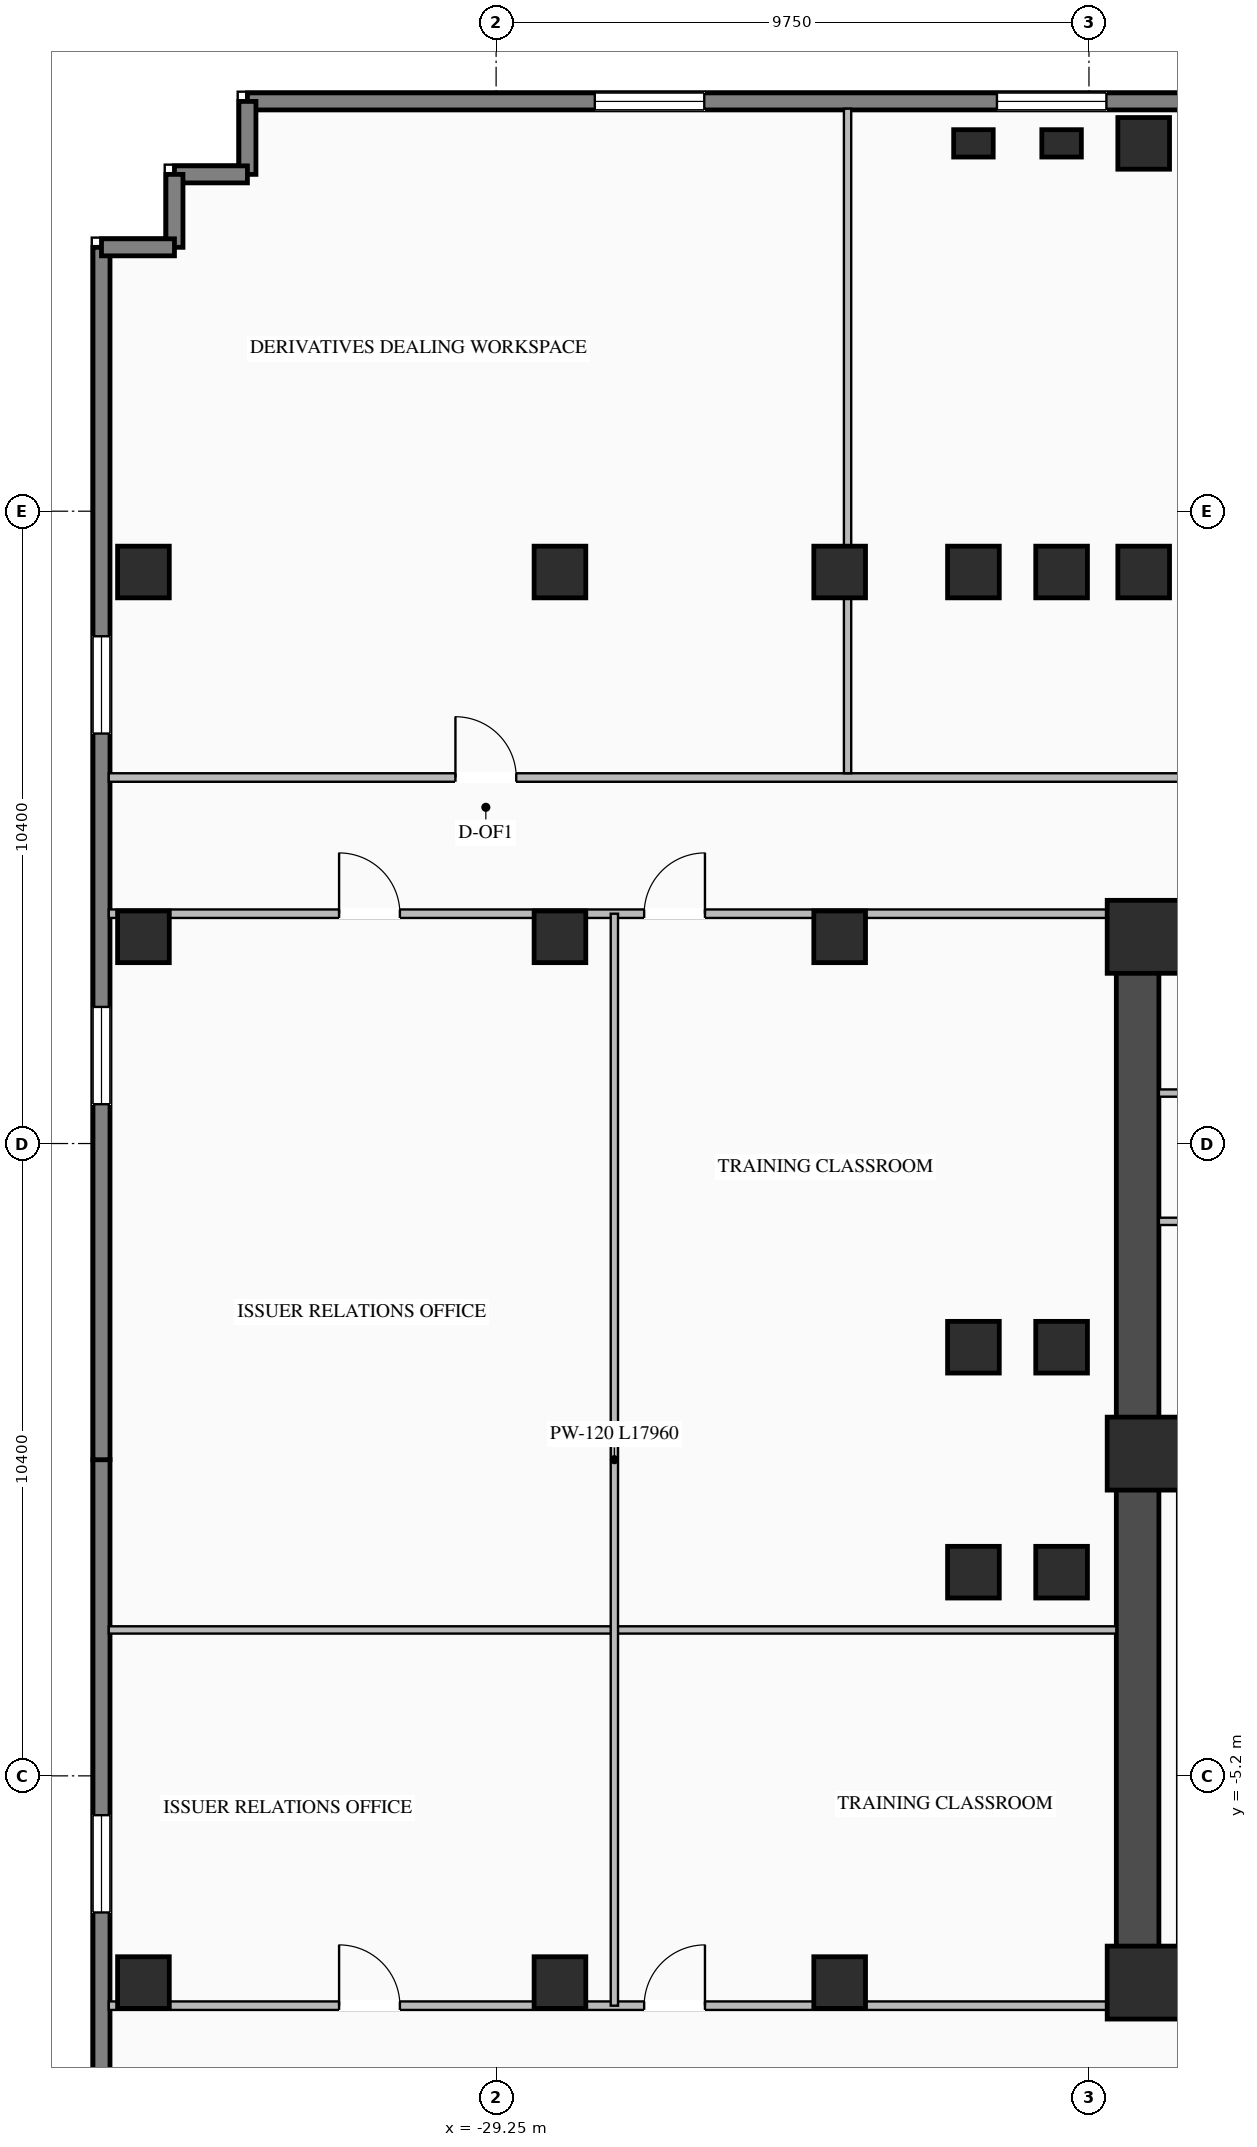
"""IFC4 building model, lengths in metres.
Left out: names, types, materials, properties, quantities, classifications, styles, units other than length and angle.
Written with IfcOpenShell. Run it as: python <this file> out.ifc"""

import sys

from ifc_helpers import new_model, si_unit, direction, frame, frame_2d, origin, origin_2d, place, context, subcontext, project, spatial, rectangle, i_section, extrude, element, fill, save


model = new_model("IFC4")
c1 = context("Model", 3, precision=1e-05, world=origin(), true_north=direction((0.0, 1.0)))
c2 = subcontext(c1, "Body", "Model", "MODEL_VIEW")
j1 = project(units=[si_unit("LENGTHUNIT", "METRE"), si_unit("PLANEANGLEUNIT", "RADIAN")], contexts=[c1])
p1 = place(None, origin())
s1 = spatial("IfcSite", under=j1, at=p1, CompositionType="ELEMENT")
p2 = place(p1, origin())
s2 = spatial("IfcBuilding", under=s1, at=p2, CompositionType="ELEMENT")
p3 = place(p2, frame((0.0, 0.0, 41.55)))
s3 = spatial("IfcBuildingStorey", under=s2, at=p3, CompositionType="ELEMENT", Elevation=41.55)
p4 = place(p3, frame((-19.05, -8.7, 0.0), z_axis=(0.0, 0.0, 1.0), x_axis=(1.0, 0.0, 0.0)))
e1 = element("IfcWall", 1, at=p4, inside=s3, PredefinedType="SHEAR", context=c2, shape_type="SweptSolid", body=[
    extrude(rectangle(XDim=10.25, YDim=0.7, at=frame_2d((5.125, 0.0))), origin(), (0.0, 0.0, 1.0), 3.27),
])
p5 = place(p3, frame((-19.05, 8.7, 0.0), z_axis=(0.0, 0.0, 1.0), x_axis=(1.0, 0.0, 0.0)))
e2 = element("IfcWall", 2, at=p5, inside=s3, PredefinedType="SHEAR", context=c2, shape_type="SweptSolid", body=[
    extrude(rectangle(XDim=10.25, YDim=0.7, at=frame_2d((5.125, 0.0))), origin(), (0.0, 0.0, 1.0), 3.27),
])
p6 = place(p5, frame((5.6, 0.0, 0.0)))
e3 = element("IfcOpeningElement", 3, at=p6, cuts=e2, PredefinedType="OPENING", context=c2, shape_type="SweptSolid", body=[
    extrude(rectangle(XDim=1.4, YDim=2.05, at=frame_2d((0.7, 1.025))), frame((0.0, 0.36, 0.0), z_axis=(0.0, -1.0, 0.0), x_axis=(1.0, 0.0, 0.0)), (0.0, 0.0, 1.0), 0.72),
])
p7 = place(p3, frame((-18.7, -8.35, 0.0), z_axis=(0.0, 0.0, 1.0), x_axis=(0.0, 1.0, 0.0)))
e4 = element("IfcWall", 4, at=p7, inside=s3, PredefinedType="SHEAR", context=c2, shape_type="SweptSolid", body=[
    extrude(rectangle(XDim=16.7, YDim=0.7, at=frame_2d((8.35, 0.0))), origin(), (0.0, 0.0, 1.0), 3.27),
])
for number, where, z_axis, x_axis in (
    (5, (-18.6, -8.6, 0.0), (0.0, 0.0, 1.0), (1.0, 0.0, 0.0)),
    (6, (-18.6, 0.1, 0.0), (0.0, 0.0, 1.0), (1.0, 0.0, 0.0)),
    (7, (-18.6, 8.6, 0.0), (0.0, 0.0, 1.0), (1.0, 0.0, 0.0)),
):
    element("IfcColumn", number, at=place(p3, frame(where, z_axis=z_axis, x_axis=x_axis)), inside=s3, PredefinedType="COLUMN", context=c2, shape_type="SweptSolid", body=[
        extrude(rectangle(XDim=1.2, YDim=1.2, at=origin_2d()), origin(), (0.0, 0.0, 1.0), 3.45),
    ])
for number, where, z_axis, x_axis in (
    (8, (-21.4, 14.6, 0.0), (0.0, 0.0, 1.0), (1.0, 0.0, 0.0)),
    (9, (-19.95, 14.6, 0.0), (0.0, 0.0, 1.0), (1.0, 0.0, 0.0)),
    (10, (-18.6, 14.6, 0.0), (0.0, 0.0, 1.0), (1.0, 0.0, 0.0)),
    (11, (-21.4, -1.85, 0.0), (0.0, 0.0, 1.0), (1.0, 0.0, 0.0)),
    (12, (-21.4, 1.85, 0.0), (0.0, 0.0, 1.0), (1.0, 0.0, 0.0)),
    (13, (-19.95, -1.85, 0.0), (0.0, 0.0, 1.0), (1.0, 0.0, 0.0)),
    (14, (-19.95, 1.85, 0.0), (0.0, 0.0, 1.0), (1.0, 0.0, 0.0)),
    (15, (-23.6, -8.6, 0.0), (0.0, 0.0, 1.0), (1.0, 0.0, 0.0)),
    (16, (-23.6, 8.6, 0.0), (0.0, 0.0, 1.0), (1.0, 0.0, 0.0)),
    (17, (-23.6, 14.6, 0.0), (0.0, 0.0, 1.0), (1.0, 0.0, 0.0)),
    (18, (-28.2, -8.6, 0.0), (0.0, 0.0, 1.0), (1.0, 0.0, 0.0)),
    (19, (-28.2, 8.6, 0.0), (0.0, 0.0, 1.0), (1.0, 0.0, 0.0)),
    (20, (-28.2, 14.6, 0.0), (0.0, 0.0, 1.0), (1.0, 0.0, 0.0)),
    (21, (-18.6, 21.65, 0.0), (0.0, 0.0, 1.0), (1.0, 0.0, 0.0)),
    (22, (-35.05, -8.6, 0.0), (0.0, 0.0, 1.0), (1.0, 0.0, 0.0)),
    (23, (-35.05, 8.6, 0.0), (0.0, 0.0, 1.0), (1.0, 0.0, 0.0)),
    (24, (-35.05, 14.6, 0.0), (0.0, 0.0, 1.0), (1.0, 0.0, 0.0)),
):
    element("IfcColumn", number, at=place(p3, frame(where, z_axis=z_axis, x_axis=x_axis)), inside=s3, PredefinedType="COLUMN", context=c2, shape_type="SweptSolid", body=[
        extrude(i_section(OverallWidth=0.85, OverallDepth=0.85, WebThickness=0.032, FlangeThickness=0.048, at=origin_2d()), origin(), (0.0, 0.0, 1.0), 3.45),
    ])
for number, where, z_axis, x_axis in (
    (25, (-21.4, 21.65, 0.0), (0.0, 0.0, 1.0), (1.0, 0.0, 0.0)),
    (26, (-19.95, 21.65, 0.0), (0.0, 0.0, 1.0), (1.0, 0.0, 0.0)),
):
    element("IfcColumn", number, at=place(p3, frame(where, z_axis=z_axis, x_axis=x_axis)), inside=s3, PredefinedType="PILASTER", context=c2, shape_type="SweptSolid", body=[
        extrude(rectangle(XDim=0.65, YDim=0.45, at=origin_2d()), origin(), (0.0, 0.0, 1.0), 3.45),
    ])
p8 = place(p3, frame((-33.34, 22.34, 0.0), z_axis=(0.0, 0.0, 1.0), x_axis=(1.0, 0.0, 0.0)))
e27 = element("IfcWall", 27, at=p8, inside=s3, PredefinedType="STANDARD", context=c2, shape_type="SweptSolid", body=[
    extrude(rectangle(XDim=19.84, YDim=0.28, at=frame_2d((9.92, 0.0))), origin(), (0.0, 0.0, 1.0), 3.25),
])
p9 = place(p8, frame((5.713, 0.0, 0.76)))
e28 = element("IfcOpeningElement", 28, at=p9, cuts=e27, PredefinedType="OPENING", context=c2, shape_type="SweptSolid", body=[
    extrude(rectangle(XDim=1.8, YDim=1.95, at=frame_2d((0.9, 0.975))), frame((0.0, 0.15, 0.0), z_axis=(0.0, -1.0, 0.0), x_axis=(1.0, 0.0, 0.0)), (0.0, 0.0, 1.0), 0.3),
])
p10 = place(p8, frame((12.327, 0.0, 0.76)))
e29 = element("IfcOpeningElement", 29, at=p10, cuts=e27, PredefinedType="OPENING", context=c2, shape_type="SweptSolid", body=[
    extrude(rectangle(XDim=1.8, YDim=1.95, at=frame_2d((0.9, 0.975))), frame((0.0, 0.15, 0.0), z_axis=(0.0, -1.0, 0.0), x_axis=(1.0, 0.0, 0.0)), (0.0, 0.0, 1.0), 0.3),
])
p11 = place(p3, frame((-35.74, -19.94, 0.0), z_axis=(0.0, 0.0, 1.0), x_axis=(0.0, 1.0, 0.0)))
e30 = element("IfcWall", 30, at=p11, inside=s3, PredefinedType="STANDARD", context=c2, shape_type="SweptSolid", body=[
    extrude(rectangle(XDim=19.94, YDim=0.28, at=frame_2d((9.97, 0.0))), origin(), (0.0, 0.0, 1.0), 3.25),
])
p12 = place(p11, frame((6.397, 0.0, 0.76)))
e31 = element("IfcOpeningElement", 31, at=p12, cuts=e30, PredefinedType="OPENING", context=c2, shape_type="SweptSolid", body=[
    extrude(rectangle(XDim=1.6, YDim=1.95, at=frame_2d((0.8, 0.975))), frame((0.0, 0.15, 0.0), z_axis=(0.0, -1.0, 0.0), x_axis=(1.0, 0.0, 0.0)), (0.0, 0.0, 1.0), 0.3),
])
p13 = place(p11, frame((12.493, 0.0, 0.76)))
e32 = element("IfcOpeningElement", 32, at=p13, cuts=e30, PredefinedType="OPENING", context=c2, shape_type="SweptSolid", body=[
    extrude(rectangle(XDim=1.6, YDim=1.95, at=frame_2d((0.8, 0.975))), frame((0.0, 0.15, 0.0), z_axis=(0.0, -1.0, 0.0), x_axis=(1.0, 0.0, 0.0)), (0.0, 0.0, 1.0), 0.3),
])
p14 = place(p3, frame((-35.74, 0.0, 0.0), z_axis=(0.0, 0.0, 1.0), x_axis=(0.0, 1.0, 0.0)))
e33 = element("IfcWall", 33, at=p14, inside=s3, PredefinedType="STANDARD", context=c2, shape_type="SweptSolid", body=[
    extrude(rectangle(XDim=19.94, YDim=0.28, at=frame_2d((9.97, 0.0))), origin(), (0.0, 0.0, 1.0), 3.25),
])
p15 = place(p14, frame((5.847, 0.0, 0.76)))
e34 = element("IfcOpeningElement", 34, at=p15, cuts=e33, PredefinedType="OPENING", context=c2, shape_type="SweptSolid", body=[
    extrude(rectangle(XDim=1.6, YDim=1.95, at=frame_2d((0.8, 0.975))), frame((0.0, 0.15, 0.0), z_axis=(0.0, -1.0, 0.0), x_axis=(1.0, 0.0, 0.0)), (0.0, 0.0, 1.0), 0.3),
])
p16 = place(p14, frame((11.943, 0.0, 0.76)))
e35 = element("IfcOpeningElement", 35, at=p16, cuts=e33, PredefinedType="OPENING", context=c2, shape_type="SweptSolid", body=[
    extrude(rectangle(XDim=1.6, YDim=1.95, at=frame_2d((0.8, 0.975))), frame((0.0, 0.15, 0.0), z_axis=(0.0, -1.0, 0.0), x_axis=(1.0, 0.0, 0.0)), (0.0, 0.0, 1.0), 0.3),
])
p17 = place(p3, frame((-33.34, 22.34, 0.0), z_axis=(0.0, 0.0, 1.0), x_axis=(0.0, -1.0, 0.0)))
e36 = element("IfcWall", 36, at=p17, inside=s3, PredefinedType="STANDARD", context=c2, shape_type="SweptSolid", body=[
    extrude(rectangle(XDim=1.2, YDim=0.28, at=frame_2d((0.6, 0.0))), origin(), (0.0, 0.0, 1.0), 3.25),
])
for number, where, z_axis, x_axis in (
    (37, (-33.34, 21.14, 0.0), (0.0, 0.0, 1.0), (-1.0, 0.0, 0.0)),
    (38, (-34.54, 21.14, 0.0), (0.0, 0.0, 1.0), (0.0, -1.0, 0.0)),
    (39, (-34.54, 19.94, 0.0), (0.0, 0.0, 1.0), (-1.0, 0.0, 0.0)),
):
    element("IfcWall", number, at=place(p3, frame(where, z_axis=z_axis, x_axis=x_axis)), inside=s3, PredefinedType="STANDARD", context=c2, shape_type="SweptSolid", body=[
        extrude(rectangle(XDim=1.2, YDim=0.28, at=frame_2d((0.6, 0.0))), origin(), (0.0, 0.0, 1.0), 3.25),
    ])
p18 = place(p3, frame((-18.35, 3.92, 0.0), z_axis=(0.0, 0.0, 1.0), x_axis=(1.0, 0.0, 0.0)))
e40 = element("IfcWall", 40, at=p18, inside=s3, PredefinedType="STANDARD", context=c2, shape_type="SweptSolid", body=[
    extrude(rectangle(XDim=4.45, YDim=0.12, at=frame_2d((2.225, 0.0))), origin(), (0.0, 0.0, 1.0), 3.25),
])
p19 = place(p3, frame((-18.35, 6.03, 0.0), z_axis=(0.0, 0.0, 1.0), x_axis=(1.0, 0.0, 0.0)))
e41 = element("IfcWall", 41, at=p19, inside=s3, PredefinedType="STANDARD", context=c2, shape_type="SweptSolid", body=[
    extrude(rectangle(XDim=2.2, YDim=0.12, at=frame_2d((1.1, 0.0))), origin(), (0.0, 0.0, 1.0), 3.25),
])
p20 = place(p3, frame((-35.62, 11.22, 0.0), z_axis=(0.0, 0.0, 1.0), x_axis=(1.0, 0.0, 0.0)))
e42 = element("IfcWall", 42, at=p20, inside=s3, PredefinedType="STANDARD", context=c2, shape_type="SweptSolid", body=[
    extrude(rectangle(XDim=71.24, YDim=0.14, at=frame_2d((35.62, 0.0))), origin(), (0.0, 0.0, 1.0), 3.25),
])
p21 = place(p20, frame((5.701, 0.0, 0.0)))
e43 = element("IfcOpeningElement", 43, at=p21, cuts=e42, PredefinedType="OPENING", context=c2, shape_type="SweptSolid", body=[
    extrude(rectangle(XDim=1.0, YDim=2.08, at=frame_2d((0.5, 1.04))), frame((0.0, 0.08, 0.0), z_axis=(0.0, -1.0, 0.0), x_axis=(1.0, 0.0, 0.0)), (0.0, 0.0, 1.0), 0.16),
])
p22 = place(p20, frame((18.762, 0.0, 0.0)))
e44 = element("IfcOpeningElement", 44, at=p22, cuts=e42, PredefinedType="OPENING", context=c2, shape_type="SweptSolid", body=[
    extrude(rectangle(XDim=1.0, YDim=2.08, at=frame_2d((0.5, 1.04))), frame((0.0, 0.08, 0.0), z_axis=(0.0, -1.0, 0.0), x_axis=(1.0, 0.0, 0.0)), (0.0, 0.0, 1.0), 0.16),
])
p23 = place(p20, frame((33.698, 0.0, 0.0)))
e45 = element("IfcOpeningElement", 45, at=p23, cuts=e42, PredefinedType="OPENING", context=c2, shape_type="SweptSolid", body=[
    extrude(rectangle(XDim=1.0, YDim=2.08, at=frame_2d((0.5, 1.04))), frame((0.0, 0.08, 0.0), z_axis=(0.0, -1.0, 0.0), x_axis=(1.0, 0.0, 0.0)), (0.0, 0.0, 1.0), 0.16),
])
p24 = place(p20, frame((49.344, 0.0, 0.0)))
e46 = element("IfcOpeningElement", 46, at=p24, cuts=e42, PredefinedType="OPENING", context=c2, shape_type="SweptSolid", body=[
    extrude(rectangle(XDim=1.0, YDim=2.08, at=frame_2d((0.5, 1.04))), frame((0.0, 0.08, 0.0), z_axis=(0.0, -1.0, 0.0), x_axis=(1.0, 0.0, 0.0)), (0.0, 0.0, 1.0), 0.16),
])
p25 = place(p20, frame((63.827, 0.0, 0.0)))
e47 = element("IfcOpeningElement", 47, at=p25, cuts=e42, PredefinedType="OPENING", context=c2, shape_type="SweptSolid", body=[
    extrude(rectangle(XDim=1.0, YDim=2.08, at=frame_2d((0.5, 1.04))), frame((0.0, 0.08, 0.0), z_axis=(0.0, -1.0, 0.0), x_axis=(1.0, 0.0, 0.0)), (0.0, 0.0, 1.0), 0.16),
])
p26 = place(p3, frame((-23.47, 11.29, 0.0), z_axis=(0.0, 0.0, 1.0), x_axis=(0.0, 1.0, 0.0)))
e48 = element("IfcWall", 48, at=p26, inside=s3, PredefinedType="STANDARD", context=c2, shape_type="SweptSolid", body=[
    extrude(rectangle(XDim=10.93, YDim=0.12, at=frame_2d((5.465, 0.0))), origin(), (0.0, 0.0, 1.0), 2.645),
])
p27 = place(p3, frame((-35.62, 8.98, 0.0), z_axis=(0.0, 0.0, 1.0), x_axis=(1.0, 0.0, 0.0)))
e49 = element("IfcWall", 49, at=p27, inside=s3, PredefinedType="STANDARD", context=c2, shape_type="SweptSolid", body=[
    extrude(rectangle(XDim=16.57, YDim=0.14, at=frame_2d((8.285, 0.0))), origin(), (0.0, 0.0, 1.0), 3.25),
])
p28 = place(p27, frame((3.788, 0.0, 0.0)))
e50 = element("IfcOpeningElement", 50, at=p28, cuts=e49, PredefinedType="OPENING", context=c2, shape_type="SweptSolid", body=[
    extrude(rectangle(XDim=1.0, YDim=2.08, at=frame_2d((0.5, 1.04))), frame((0.0, 0.08, 0.0), z_axis=(0.0, -1.0, 0.0), x_axis=(1.0, 0.0, 0.0)), (0.0, 0.0, 1.0), 0.16),
])
p29 = place(p27, frame((8.805, 0.0, 0.0)))
e51 = element("IfcOpeningElement", 51, at=p29, cuts=e49, PredefinedType="OPENING", context=c2, shape_type="SweptSolid", body=[
    extrude(rectangle(XDim=1.0, YDim=2.08, at=frame_2d((0.5, 1.04))), frame((0.0, 0.08, 0.0), z_axis=(0.0, -1.0, 0.0), x_axis=(1.0, 0.0, 0.0)), (0.0, 0.0, 1.0), 0.16),
])
p30 = place(p3, frame((-35.62, -8.98, 0.0), z_axis=(0.0, 0.0, 1.0), x_axis=(1.0, 0.0, 0.0)))
e52 = element("IfcWall", 52, at=p30, inside=s3, PredefinedType="STANDARD", context=c2, shape_type="SweptSolid", body=[
    extrude(rectangle(XDim=16.57, YDim=0.14, at=frame_2d((8.285, 0.0))), origin(), (0.0, 0.0, 1.0), 3.25),
])
p31 = place(p30, frame((3.788, 0.0, 0.0)))
e53 = element("IfcOpeningElement", 53, at=p31, cuts=e52, PredefinedType="OPENING", context=c2, shape_type="SweptSolid", body=[
    extrude(rectangle(XDim=1.0, YDim=2.08, at=frame_2d((0.5, 1.04))), frame((0.0, 0.08, 0.0), z_axis=(0.0, -1.0, 0.0), x_axis=(1.0, 0.0, 0.0)), (0.0, 0.0, 1.0), 0.16),
])
p32 = place(p30, frame((8.805, 0.0, 0.0)))
e54 = element("IfcOpeningElement", 54, at=p32, cuts=e52, PredefinedType="OPENING", context=c2, shape_type="SweptSolid", body=[
    extrude(rectangle(XDim=1.0, YDim=2.08, at=frame_2d((0.5, 1.04))), frame((0.0, 0.08, 0.0), z_axis=(0.0, -1.0, 0.0), x_axis=(1.0, 0.0, 0.0)), (0.0, 0.0, 1.0), 0.16),
])
p33 = place(p3, frame((-35.62, -2.8, 0.0), z_axis=(0.0, 0.0, 1.0), x_axis=(1.0, 0.0, 0.0)))
e55 = element("IfcWall", 55, at=p33, inside=s3, PredefinedType="STANDARD", context=c2, shape_type="SweptSolid", body=[
    extrude(rectangle(XDim=16.57, YDim=0.12, at=frame_2d((8.285, 0.0))), origin(), (0.0, 0.0, 1.0), 3.25),
])
p34 = place(p3, frame((-27.305, -8.98, 0.0), z_axis=(0.0, 0.0, 1.0), x_axis=(0.0, 1.0, 0.0)))
e56 = element("IfcWall", 56, at=p34, inside=s3, PredefinedType="STANDARD", context=c2, shape_type="SweptSolid", body=[
    extrude(rectangle(XDim=17.96, YDim=0.12, at=frame_2d((8.98, 0.0))), origin(), (0.0, 0.0, 1.0), 3.25),
])
p35 = place(p9, origin())
e57 = element("IfcWindow", 57, at=p35, inside=s3, PartitioningType="SINGLE_PANEL", PredefinedType="WINDOW", context=c2, shape_type="SweptSolid", body=[
    extrude(rectangle(XDim=1.8, YDim=1.95, at=frame_2d((0.9, 0.975))), frame((0.0, 0.03, 0.0), z_axis=(0.0, -1.0, 0.0), x_axis=(1.0, 0.0, 0.0)), (0.0, 0.0, 1.0), 0.06),
])
fill(e28, e57)
p36 = place(p10, origin())
e58 = element("IfcWindow", 58, at=p36, inside=s3, PartitioningType="SINGLE_PANEL", PredefinedType="WINDOW", context=c2, shape_type="SweptSolid", body=[
    extrude(rectangle(XDim=1.8, YDim=1.95, at=frame_2d((0.9, 0.975))), frame((0.0, 0.03, 0.0), z_axis=(0.0, -1.0, 0.0), x_axis=(1.0, 0.0, 0.0)), (0.0, 0.0, 1.0), 0.06),
])
fill(e29, e58)
p37 = place(p13, origin())
e59 = element("IfcWindow", 59, at=p37, inside=s3, PartitioningType="SINGLE_PANEL", PredefinedType="WINDOW", context=c2, shape_type="SweptSolid", body=[
    extrude(rectangle(XDim=1.6, YDim=1.95, at=frame_2d((0.8, 0.975))), frame((0.0, 0.03, 0.0), z_axis=(0.0, -1.0, 0.0), x_axis=(1.0, 0.0, 0.0)), (0.0, 0.0, 1.0), 0.06),
])
fill(e32, e59)
p38 = place(p15, origin())
e60 = element("IfcWindow", 60, at=p38, inside=s3, PartitioningType="SINGLE_PANEL", PredefinedType="WINDOW", context=c2, shape_type="SweptSolid", body=[
    extrude(rectangle(XDim=1.6, YDim=1.95, at=frame_2d((0.8, 0.975))), frame((0.0, 0.03, 0.0), z_axis=(0.0, -1.0, 0.0), x_axis=(1.0, 0.0, 0.0)), (0.0, 0.0, 1.0), 0.06),
])
fill(e34, e60)
p39 = place(p16, origin())
e61 = element("IfcWindow", 61, at=p39, inside=s3, PartitioningType="SINGLE_PANEL", PredefinedType="WINDOW", context=c2, shape_type="SweptSolid", body=[
    extrude(rectangle(XDim=1.6, YDim=1.95, at=frame_2d((0.8, 0.975))), frame((0.0, 0.03, 0.0), z_axis=(0.0, -1.0, 0.0), x_axis=(1.0, 0.0, 0.0)), (0.0, 0.0, 1.0), 0.06),
])
fill(e35, e61)
p40 = place(p21, origin())
e62 = element("IfcDoor", 62, at=p40, inside=s3, OperationType="SINGLE_SWING_LEFT", PredefinedType="DOOR", context=c2, shape_type="SweptSolid", body=[
    extrude(rectangle(XDim=1.0, YDim=2.08, at=frame_2d((0.5, 1.04))), frame((0.0, 0.025, 0.0), z_axis=(0.0, -1.0, 0.0), x_axis=(1.0, 0.0, 0.0)), (0.0, 0.0, 1.0), 0.05),
])
fill(e43, e62)
p41 = place(p28, origin())
e63 = element("IfcDoor", 63, at=p41, inside=s3, OperationType="SINGLE_SWING_LEFT", PredefinedType="DOOR", context=c2, shape_type="SweptSolid", body=[
    extrude(rectangle(XDim=1.0, YDim=2.08, at=frame_2d((0.5, 1.04))), frame((0.0, 0.025, 0.0), z_axis=(0.0, -1.0, 0.0), x_axis=(1.0, 0.0, 0.0)), (0.0, 0.0, 1.0), 0.05),
])
fill(e50, e63)
p42 = place(p29, origin())
e64 = element("IfcDoor", 64, at=p42, inside=s3, OperationType="SINGLE_SWING_RIGHT", PredefinedType="DOOR", context=c2, shape_type="SweptSolid", body=[
    extrude(rectangle(XDim=1.0, YDim=2.08, at=frame_2d((0.5, 1.04))), frame((0.0, 0.025, 0.0), z_axis=(0.0, -1.0, 0.0), x_axis=(1.0, 0.0, 0.0)), (0.0, 0.0, 1.0), 0.05),
])
fill(e51, e64)
p43 = place(p31, origin())
e65 = element("IfcDoor", 65, at=p43, inside=s3, OperationType="SINGLE_SWING_LEFT", PredefinedType="DOOR", context=c2, shape_type="SweptSolid", body=[
    extrude(rectangle(XDim=1.0, YDim=2.08, at=frame_2d((0.5, 1.04))), frame((0.0, 0.025, 0.0), z_axis=(0.0, -1.0, 0.0), x_axis=(1.0, 0.0, 0.0)), (0.0, 0.0, 1.0), 0.05),
])
fill(e53, e65)
p44 = place(p32, origin())
e66 = element("IfcDoor", 66, at=p44, inside=s3, OperationType="SINGLE_SWING_RIGHT", PredefinedType="DOOR", context=c2, shape_type="SweptSolid", body=[
    extrude(rectangle(XDim=1.0, YDim=2.08, at=frame_2d((0.5, 1.04))), frame((0.0, 0.025, 0.0), z_axis=(0.0, -1.0, 0.0), x_axis=(1.0, 0.0, 0.0)), (0.0, 0.0, 1.0), 0.05),
])
fill(e54, e66)
save(model, sys.argv[1])
